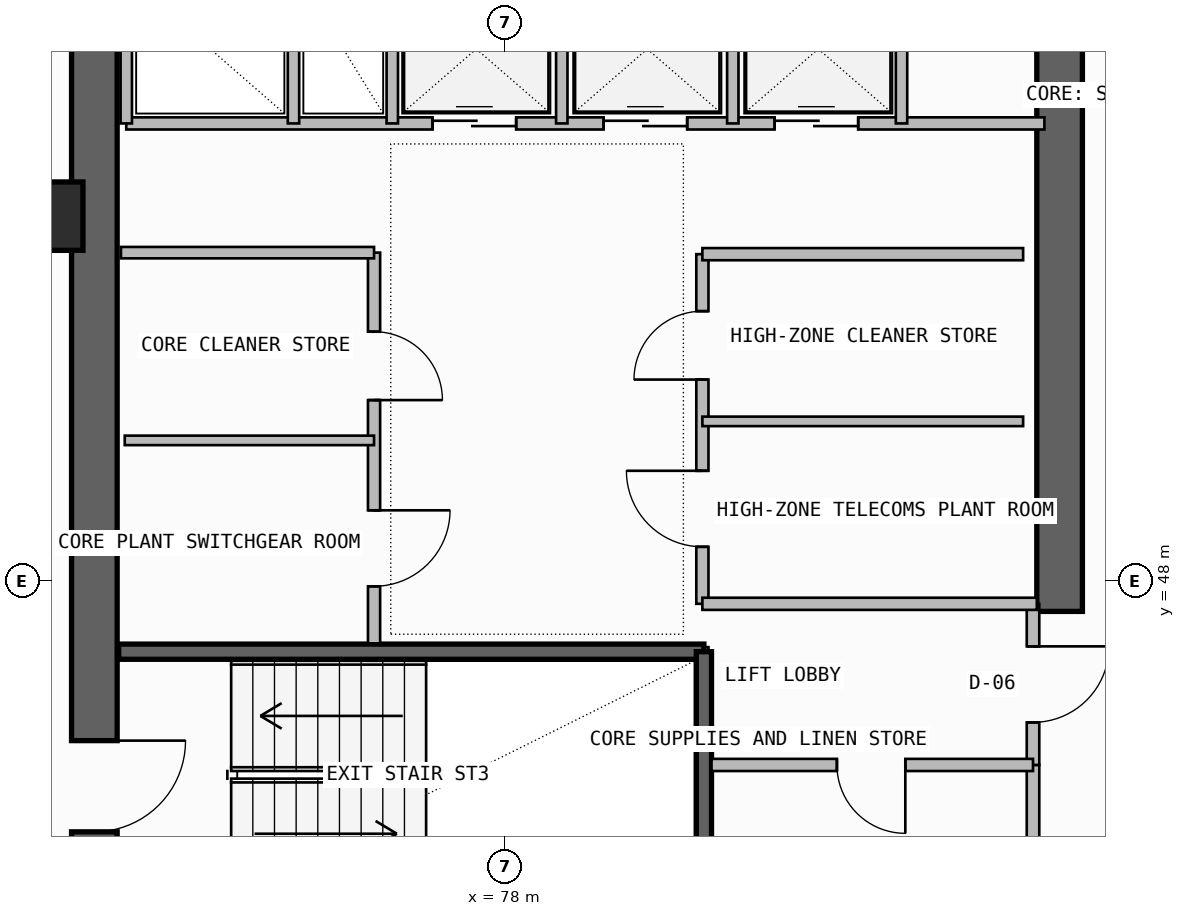
"""IFC4 building model, lengths in metres.
Left out: names, types, materials, properties, quantities, classifications, styles, units other than length and angle.
Written with IfcOpenShell. Run it as: python <this file> out.ifc"""

import sys

from ifc_helpers import new_model, si_unit, direction, frame, frame_2d, origin, origin_2d, place, context, subcontext, project, spatial, rectangle, extrude, element, fill, save


model = new_model("IFC4")
c1 = context("Model", 3, precision=1e-05, world=origin(), true_north=direction((0.0, 1.0)))
c2 = subcontext(c1, "Body", "Model", "MODEL_VIEW")
j1 = project(units=[si_unit("LENGTHUNIT", "METRE"), si_unit("PLANEANGLEUNIT", "RADIAN")], contexts=[c1])
p1 = place(None, origin())
s1 = spatial("IfcSite", under=j1, at=p1, CompositionType="ELEMENT")
p2 = place(p1, origin())
s2 = spatial("IfcBuilding", under=s1, at=p2, CompositionType="ELEMENT")
p3 = place(p2, frame((0.0, 0.0, 232.58)))
s3 = spatial("IfcBuildingStorey", under=s2, at=p3, CompositionType="ELEMENT", Elevation=232.58)
p4 = place(p3, frame((72.6, 43.35, -0.26), z_axis=(0.0, 0.0, 1.0), x_axis=(0.0, 1.0, 0.0)))
e1 = element("IfcWall", 1, at=p4, inside=s3, PredefinedType="SHEAR", context=c2, shape_type="SweptSolid", body=[
    extrude(rectangle(XDim=12.7, YDim=0.6, at=frame_2d((6.35, 0.0))), origin(), (0.0, 0.0, 1.0), 3.52),
])
p5 = place(p4, frame((1.35, 0.0, 0.26)))
e2 = element("IfcOpeningElement", 2, at=p5, cuts=e1, PredefinedType="OPENING", context=c2, shape_type="SweptSolid", body=[
    extrude(rectangle(XDim=1.2, YDim=2.2, at=frame_2d((0.6, 1.1))), frame((0.0, 0.31, 0.0), z_axis=(0.0, -1.0, 0.0), x_axis=(1.0, 0.0, 0.0)), (0.0, 0.0, 1.0), 0.62),
])
p6 = place(p3, frame((85.3, 47.6, -0.26), z_axis=(0.0, 0.0, 1.0), x_axis=(0.0, 1.0, 0.0)))
e3 = element("IfcWall", 3, at=p6, inside=s3, PredefinedType="SHEAR", context=c2, shape_type="SweptSolid", body=[
    extrude(rectangle(XDim=8.45, YDim=0.6, at=frame_2d((4.225, 0.0))), origin(), (0.0, 0.0, 1.0), 3.52),
])
p7 = place(p3, frame((72.0, 52.8, 0.0), z_axis=(0.0, 0.0, 1.0), x_axis=(1.0, 0.0, 0.0)))
e4 = element("IfcColumn", 4, at=p7, inside=s3, PredefinedType="COLUMN", context=c2, shape_type="SweptSolid", body=[
    extrude(rectangle(XDim=0.9, YDim=0.9, at=origin_2d()), origin(), (0.0, 0.0, 1.0), 3.52),
])
p8 = place(p3, frame((72.92, 47.07, -0.26), z_axis=(0.0, 0.0, 1.0), x_axis=(1.0, 0.0, 0.0)))
e5 = element("IfcWall", 5, at=p8, inside=s3, PredefinedType="SOLIDWALL", context=c2, shape_type="SweptSolid", body=[
    extrude(rectangle(XDim=7.7, YDim=0.2, at=frame_2d((3.85, 0.0))), origin(), (0.0, 0.0, 1.0), 3.52),
])
p9 = place(p3, frame((80.62, 43.83, -0.26), z_axis=(0.0, 0.0, 1.0), x_axis=(0.0, 1.0, 0.0)))
e6 = element("IfcWall", 6, at=p9, inside=s3, PredefinedType="SOLIDWALL", context=c2, shape_type="SweptSolid", body=[
    extrude(rectangle(XDim=3.24, YDim=0.2, at=frame_2d((1.62, 0.0))), origin(), (0.0, 0.0, 1.0), 3.52),
])
p10 = place(p3, frame((84.95, 43.68, 0.0), z_axis=(0.0, 0.0, 1.0), x_axis=(0.0, 1.0, 0.0)))
e7 = element("IfcWall", 7, at=p10, inside=s3, PredefinedType="PLUMBINGWALL", context=c2, shape_type="SweptSolid", body=[
    extrude(rectangle(XDim=1.9, YDim=0.165, at=frame_2d((0.95, 0.0))), origin(), (0.0, 0.0, 1.0), 3.26),
])
p11 = place(p3, frame((84.95, 45.58, 0.0), z_axis=(0.0, 0.0, 1.0), x_axis=(0.0, 1.0, 0.0)))
e8 = element("IfcWall", 8, at=p11, inside=s3, PredefinedType="PARTITIONING", context=c2, shape_type="SweptSolid", body=[
    extrude(rectangle(XDim=2.12, YDim=0.165, at=frame_2d((1.06, 0.0))), origin(), (0.0, 0.0, 1.0), 3.26),
])
p12 = place(p11, frame((0.56, 0.0, 0.0)))
e9 = element("IfcOpeningElement", 9, at=p12, cuts=e8, PredefinedType="OPENING", context=c2, shape_type="SweptSolid", body=[
    extrude(rectangle(XDim=1.0, YDim=2.2, at=frame_2d((0.5, 1.1))), frame((0.0, 0.093, 0.0), z_axis=(0.0, -1.0, 0.0), x_axis=(1.0, 0.0, 0.0)), (0.0, 0.0, 1.0), 0.185),
])
p13 = place(p3, frame((80.72, 45.58, 0.0), z_axis=(0.0, 0.0, 1.0), x_axis=(1.0, 0.0, 0.0)))
e10 = element("IfcWall", 10, at=p13, inside=s3, PredefinedType="PLUMBINGWALL", context=c2, shape_type="SweptSolid", body=[
    extrude(rectangle(XDim=4.23, YDim=0.16, at=frame_2d((2.115, 0.0))), origin(), (0.0, 0.0, 1.0), 3.26),
])
p14 = place(p13, frame((1.65, 0.0, 0.0)))
e11 = element("IfcOpeningElement", 11, at=p14, cuts=e10, PredefinedType="OPENING", context=c2, shape_type="SweptSolid", body=[
    extrude(rectangle(XDim=0.9, YDim=2.1, at=frame_2d((0.45, 1.05))), frame((0.0, 0.09, 0.0), z_axis=(0.0, -1.0, 0.0), x_axis=(1.0, 0.0, 0.0)), (0.0, 0.0, 1.0), 0.18),
])
p15 = place(p3, frame((76.28, 47.18, 0.0), z_axis=(0.0, 0.0, 1.0), x_axis=(0.0, 1.0, 0.0)))
e12 = element("IfcWall", 12, at=p15, inside=s3, PredefinedType="SOLIDWALL", context=c2, shape_type="SweptSolid", body=[
    extrude(rectangle(XDim=5.14, YDim=0.16, at=frame_2d((2.57, 0.0))), origin(), (0.0, 0.0, 1.0), 3.26),
])
p16 = place(p15, frame((0.75, 0.0, 0.0)))
e13 = element("IfcOpeningElement", 13, at=p16, cuts=e12, PredefinedType="OPENING", context=c2, shape_type="SweptSolid", body=[
    extrude(rectangle(XDim=1.0, YDim=2.2, at=frame_2d((0.5, 1.1))), frame((0.0, 0.09, 0.0), z_axis=(0.0, -1.0, 0.0), x_axis=(1.0, 0.0, 0.0)), (0.0, 0.0, 1.0), 0.18),
])
p17 = place(p15, frame((3.2, 0.0, 0.0)))
e14 = element("IfcOpeningElement", 14, at=p17, cuts=e12, PredefinedType="OPENING", context=c2, shape_type="SweptSolid", body=[
    extrude(rectangle(XDim=0.9, YDim=2.1, at=frame_2d((0.45, 1.05))), frame((0.0, 0.09, 0.0), z_axis=(0.0, -1.0, 0.0), x_axis=(1.0, 0.0, 0.0)), (0.0, 0.0, 1.0), 0.18),
])
p18 = place(p3, frame((72.95, 52.32, 0.0), z_axis=(0.0, 0.0, 1.0), x_axis=(1.0, 0.0, 0.0)))
e15 = element("IfcWall", 15, at=p18, inside=s3, PredefinedType="SOLIDWALL", context=c2, shape_type="SweptSolid", body=[
    extrude(rectangle(XDim=3.33, YDim=0.15, at=frame_2d((1.665, 0.0))), origin(), (0.0, 0.0, 1.0), 3.26),
])
p19 = place(p3, frame((73.0, 49.85, 0.0), z_axis=(0.0, 0.0, 1.0), x_axis=(1.0, 0.0, 0.0)))
e16 = element("IfcWall", 16, at=p19, inside=s3, PredefinedType="PARTITIONING", context=c2, shape_type="SweptSolid", body=[
    extrude(rectangle(XDim=3.28, YDim=0.125, at=frame_2d((1.64, 0.0))), origin(), (0.0, 0.0, 1.0), 3.26),
])
p20 = place(p3, frame((80.6, 47.7, 0.0), z_axis=(0.0, 0.0, 1.0), x_axis=(0.0, 1.0, 0.0)))
e17 = element("IfcWall", 17, at=p20, inside=s3, PredefinedType="SOLIDWALL", context=c2, shape_type="SweptSolid", body=[
    extrude(rectangle(XDim=4.6, YDim=0.16, at=frame_2d((2.3, 0.0))), origin(), (0.0, 0.0, 1.0), 3.26),
])
p21 = place(p20, frame((0.75, 0.0, 0.0)))
e18 = element("IfcOpeningElement", 18, at=p21, cuts=e17, PredefinedType="OPENING", context=c2, shape_type="SweptSolid", body=[
    extrude(rectangle(XDim=1.0, YDim=2.2, at=frame_2d((0.5, 1.1))), frame((0.0, 0.09, 0.0), z_axis=(0.0, -1.0, 0.0), x_axis=(1.0, 0.0, 0.0)), (0.0, 0.0, 1.0), 0.18),
])
p22 = place(p20, frame((2.95, 0.0, 0.0)))
e19 = element("IfcOpeningElement", 19, at=p22, cuts=e17, PredefinedType="OPENING", context=c2, shape_type="SweptSolid", body=[
    extrude(rectangle(XDim=0.9, YDim=2.1, at=frame_2d((0.45, 1.05))), frame((0.0, 0.09, 0.0), z_axis=(0.0, -1.0, 0.0), x_axis=(1.0, 0.0, 0.0)), (0.0, 0.0, 1.0), 0.18),
])
p23 = place(p3, frame((80.6, 47.7, 0.0), z_axis=(0.0, 0.0, 1.0), x_axis=(1.0, 0.0, 0.0)))
e20 = element("IfcWall", 20, at=p23, inside=s3, PredefinedType="SOLIDWALL", context=c2, shape_type="SweptSolid", body=[
    extrude(rectangle(XDim=4.4, YDim=0.16, at=frame_2d((2.2, 0.0))), origin(), (0.0, 0.0, 1.0), 3.26),
])
p24 = place(p3, frame((80.6, 52.3, 0.0), z_axis=(0.0, 0.0, 1.0), x_axis=(1.0, 0.0, 0.0)))
e21 = element("IfcWall", 21, at=p24, inside=s3, PredefinedType="SOLIDWALL", context=c2, shape_type="SweptSolid", body=[
    extrude(rectangle(XDim=4.22, YDim=0.16, at=frame_2d((2.11, 0.0))), origin(), (0.0, 0.0, 1.0), 3.26),
])
p25 = place(p3, frame((80.6, 50.1, 0.0), z_axis=(0.0, 0.0, 1.0), x_axis=(1.0, 0.0, 0.0)))
e22 = element("IfcWall", 22, at=p25, inside=s3, PredefinedType="PARTITIONING", context=c2, shape_type="SweptSolid", body=[
    extrude(rectangle(XDim=4.22, YDim=0.125, at=frame_2d((2.11, 0.0))), origin(), (0.0, 0.0, 1.0), 3.26),
])
p26 = place(p3, frame((73.02, 54.02, 0.0), z_axis=(0.0, 0.0, 1.0), x_axis=(1.0, 0.0, 0.0)))
e23 = element("IfcWall", 23, at=p26, inside=s3, PredefinedType="SOLIDWALL", context=c2, shape_type="SweptSolid", body=[
    extrude(rectangle(XDim=12.08, YDim=0.16, at=frame_2d((6.04, 0.0))), origin(), (0.0, 0.0, 1.0), 3.26),
])
p27 = place(p26, frame((4.03, 0.0, 0.0)))
e24 = element("IfcOpeningElement", 24, at=p27, cuts=e23, PredefinedType="OPENING", context=c2, shape_type="SweptSolid", body=[
    extrude(rectangle(XDim=1.1, YDim=2.25, at=frame_2d((0.55, 1.125))), frame((0.0, 0.09, 0.0), z_axis=(0.0, -1.0, 0.0), x_axis=(1.0, 0.0, 0.0)), (0.0, 0.0, 1.0), 0.18),
])
p28 = place(p26, frame((6.28, 0.0, 0.0)))
e25 = element("IfcOpeningElement", 25, at=p28, cuts=e23, PredefinedType="OPENING", context=c2, shape_type="SweptSolid", body=[
    extrude(rectangle(XDim=1.1, YDim=2.25, at=frame_2d((0.55, 1.125))), frame((0.0, 0.09, 0.0), z_axis=(0.0, -1.0, 0.0), x_axis=(1.0, 0.0, 0.0)), (0.0, 0.0, 1.0), 0.18),
])
p29 = place(p26, frame((8.53, 0.0, 0.0)))
e26 = element("IfcOpeningElement", 26, at=p29, cuts=e23, PredefinedType="OPENING", context=c2, shape_type="SweptSolid", body=[
    extrude(rectangle(XDim=1.1, YDim=2.25, at=frame_2d((0.55, 1.125))), frame((0.0, 0.09, 0.0), z_axis=(0.0, -1.0, 0.0), x_axis=(1.0, 0.0, 0.0)), (0.0, 0.0, 1.0), 0.18),
])
p30 = place(p3, frame((73.02, 54.02, 0.0), z_axis=(0.0, 0.0, 1.0), x_axis=(0.0, 1.0, 0.0)))
e27 = element("IfcWall", 27, at=p30, inside=s3, PredefinedType="PLUMBINGWALL", context=c2, shape_type="SweptSolid", body=[
    extrude(rectangle(XDim=1.94, YDim=0.15, at=frame_2d((0.97, 0.0))), origin(), (0.0, 0.0, 1.0), 3.26),
])
p31 = place(p3, frame((76.52, 54.02, 0.0), z_axis=(0.0, 0.0, 1.0), x_axis=(0.0, 1.0, 0.0)))
e28 = element("IfcWall", 28, at=p31, inside=s3, PredefinedType="SOLIDWALL", context=c2, shape_type="SweptSolid", body=[
    extrude(rectangle(XDim=1.94, YDim=0.15, at=frame_2d((0.97, 0.0))), origin(), (0.0, 0.0, 1.0), 3.26),
])
p32 = place(p3, frame((75.22, 54.02, 0.0), z_axis=(0.0, 0.0, 1.0), x_axis=(0.0, 1.0, 0.0)))
e29 = element("IfcWall", 29, at=p32, inside=s3, PredefinedType="PLUMBINGWALL", context=c2, shape_type="SweptSolid", body=[
    extrude(rectangle(XDim=1.94, YDim=0.15, at=frame_2d((0.97, 0.0))), origin(), (0.0, 0.0, 1.0), 3.26),
])
for number, where, z_axis, x_axis in (
    (30, (78.75, 54.02, 0.0), (0.0, 0.0, 1.0), (0.0, 1.0, 0.0)),
    (31, (81.0, 54.02, 0.0), (0.0, 0.0, 1.0), (0.0, 1.0, 0.0)),
):
    element("IfcWall", number, at=place(p3, frame(where, z_axis=z_axis, x_axis=x_axis)), inside=s3, PredefinedType="PLUMBINGWALL", context=c2, shape_type="SweptSolid", body=[
        extrude(rectangle(XDim=1.96, YDim=0.15, at=frame_2d((0.98, 0.0))), origin(), (0.0, 0.0, 1.0), 3.26),
    ])
p33 = place(p3, frame((83.22, 54.02, 0.0), z_axis=(0.0, 0.0, 1.0), x_axis=(0.0, 1.0, 0.0)))
e32 = element("IfcWall", 32, at=p33, inside=s3, PredefinedType="SOLIDWALL", context=c2, shape_type="SweptSolid", body=[
    extrude(rectangle(XDim=1.96, YDim=0.15, at=frame_2d((0.98, 0.0))), origin(), (0.0, 0.0, 1.0), 3.26),
])
p34 = place(p5, frame((1.2, 0.0, 0.0), z_axis=(0.0, 0.0, 1.0), x_axis=(-1.0, 0.0, 0.0)))
e33 = element("IfcDoor", 33, at=p34, inside=s3, OperationType="SINGLE_SWING_LEFT", PredefinedType="USERDEFINED", context=c2, shape_type="SweptSolid", body=[
    extrude(rectangle(XDim=1.2, YDim=2.2, at=frame_2d((0.6, 1.1))), frame((0.0, 0.025, 0.0), z_axis=(0.0, -1.0, 0.0), x_axis=(1.0, 0.0, 0.0)), (0.0, 0.0, 1.0), 0.05),
])
fill(e2, e33)
p35 = place(p12, frame((1.0, 0.0, 0.0), z_axis=(0.0, 0.0, 1.0), x_axis=(-1.0, 0.0, 0.0)))
e34 = element("IfcDoor", 34, at=p35, inside=s3, OperationType="SINGLE_SWING_LEFT", PredefinedType="DOOR", context=c2, shape_type="SweptSolid", body=[
    extrude(rectangle(XDim=1.0, YDim=2.2, at=frame_2d((0.5, 1.1))), frame((0.0, 0.025, 0.0), z_axis=(0.0, -1.0, 0.0), x_axis=(1.0, 0.0, 0.0)), (0.0, 0.0, 1.0), 0.05),
])
fill(e9, e34)
p36 = place(p14, frame((0.9, 0.0, 0.0), z_axis=(0.0, 0.0, 1.0), x_axis=(-1.0, 0.0, 0.0)))
e35 = element("IfcDoor", 35, at=p36, inside=s3, OperationType="SINGLE_SWING_LEFT", PredefinedType="DOOR", context=c2, shape_type="SweptSolid", body=[
    extrude(rectangle(XDim=0.9, YDim=2.1, at=frame_2d((0.45, 1.05))), frame((0.0, 0.025, 0.0), z_axis=(0.0, -1.0, 0.0), x_axis=(1.0, 0.0, 0.0)), (0.0, 0.0, 1.0), 0.05),
])
fill(e11, e35)
p37 = place(p16, frame((1.0, 0.0, 0.0), z_axis=(0.0, 0.0, 1.0), x_axis=(-1.0, 0.0, 0.0)))
e36 = element("IfcDoor", 36, at=p37, inside=s3, OperationType="SINGLE_SWING_LEFT", PredefinedType="DOOR", context=c2, shape_type="SweptSolid", body=[
    extrude(rectangle(XDim=1.0, YDim=2.2, at=frame_2d((0.5, 1.1))), frame((0.0, 0.025, 0.0), z_axis=(0.0, -1.0, 0.0), x_axis=(1.0, 0.0, 0.0)), (0.0, 0.0, 1.0), 0.05),
])
fill(e13, e36)
p38 = place(p17, frame((0.9, 0.0, 0.0), z_axis=(0.0, 0.0, 1.0), x_axis=(-1.0, 0.0, 0.0)))
e37 = element("IfcDoor", 37, at=p38, inside=s3, OperationType="SINGLE_SWING_RIGHT", PredefinedType="DOOR", context=c2, shape_type="SweptSolid", body=[
    extrude(rectangle(XDim=0.9, YDim=2.1, at=frame_2d((0.45, 1.05))), frame((0.0, 0.025, 0.0), z_axis=(0.0, -1.0, 0.0), x_axis=(1.0, 0.0, 0.0)), (0.0, 0.0, 1.0), 0.05),
])
fill(e14, e37)
p39 = place(p21, origin())
e38 = element("IfcDoor", 38, at=p39, inside=s3, OperationType="SINGLE_SWING_RIGHT", PredefinedType="DOOR", context=c2, shape_type="SweptSolid", body=[
    extrude(rectangle(XDim=1.0, YDim=2.2, at=frame_2d((0.5, 1.1))), frame((0.0, 0.025, 0.0), z_axis=(0.0, -1.0, 0.0), x_axis=(1.0, 0.0, 0.0)), (0.0, 0.0, 1.0), 0.05),
])
fill(e18, e38)
p40 = place(p22, origin())
e39 = element("IfcDoor", 39, at=p40, inside=s3, OperationType="SINGLE_SWING_LEFT", PredefinedType="DOOR", context=c2, shape_type="SweptSolid", body=[
    extrude(rectangle(XDim=0.9, YDim=2.1, at=frame_2d((0.45, 1.05))), frame((0.0, 0.025, 0.0), z_axis=(0.0, -1.0, 0.0), x_axis=(1.0, 0.0, 0.0)), (0.0, 0.0, 1.0), 0.05),
])
fill(e19, e39)
p41 = place(p27, origin())
e40 = element("IfcDoor", 40, at=p41, inside=s3, OperationType="DOUBLE_DOOR_SLIDING", PredefinedType="DOOR", context=c2, shape_type="SweptSolid", body=[
    extrude(rectangle(XDim=1.1, YDim=2.25, at=frame_2d((0.55, 1.125))), frame((0.0, 0.025, 0.0), z_axis=(0.0, -1.0, 0.0), x_axis=(1.0, 0.0, 0.0)), (0.0, 0.0, 1.0), 0.05),
])
fill(e24, e40)
p42 = place(p28, origin())
e41 = element("IfcDoor", 41, at=p42, inside=s3, OperationType="DOUBLE_DOOR_SLIDING", PredefinedType="DOOR", context=c2, shape_type="SweptSolid", body=[
    extrude(rectangle(XDim=1.1, YDim=2.25, at=frame_2d((0.55, 1.125))), frame((0.0, 0.025, 0.0), z_axis=(0.0, -1.0, 0.0), x_axis=(1.0, 0.0, 0.0)), (0.0, 0.0, 1.0), 0.05),
])
fill(e25, e41)
p43 = place(p29, origin())
e42 = element("IfcDoor", 42, at=p43, inside=s3, OperationType="DOUBLE_DOOR_SLIDING", PredefinedType="DOOR", context=c2, shape_type="SweptSolid", body=[
    extrude(rectangle(XDim=1.1, YDim=2.25, at=frame_2d((0.55, 1.125))), frame((0.0, 0.025, 0.0), z_axis=(0.0, -1.0, 0.0), x_axis=(1.0, 0.0, 0.0)), (0.0, 0.0, 1.0), 0.05),
])
fill(e26, e42)
save(model, sys.argv[1])
